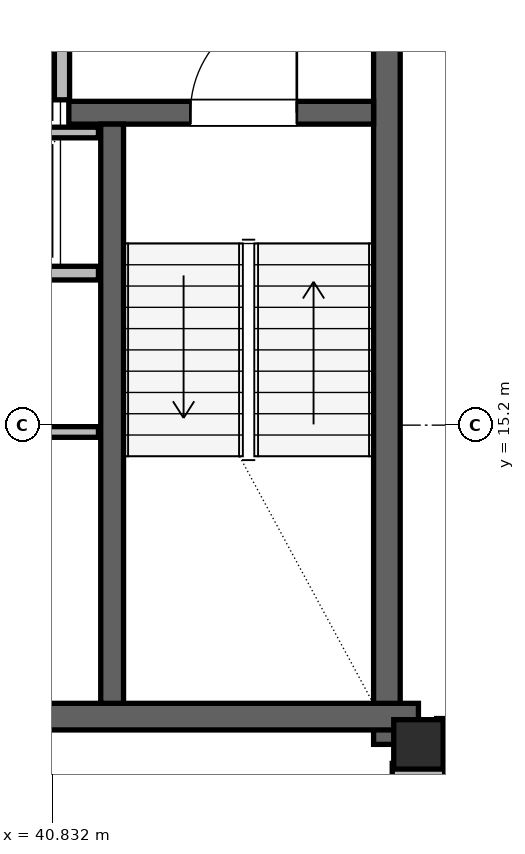
"""IFC4 building model, lengths in metres.
Left out: names, types, materials, properties, quantities, classifications, styles, units other than length and angle.
Written with IfcOpenShell. Run it as: python <this file> out.ifc"""

import sys

from ifc_helpers import new_model, si_unit, direction, frame, frame_2d, origin, origin_2d, place, context, subcontext, project, spatial, rectangle, hollow_rectangle, extrude, element, fill, save


model = new_model("IFC4")
c1 = context("Model", 3, precision=1e-05, world=origin(), true_north=direction((0.0, 1.0)))
c2 = subcontext(c1, "Body", "Model", "MODEL_VIEW")
j1 = project(units=[si_unit("LENGTHUNIT", "METRE"), si_unit("PLANEANGLEUNIT", "RADIAN")], contexts=[c1])
p1 = place(None, origin())
s1 = spatial("IfcSite", under=j1, at=p1, CompositionType="ELEMENT")
p2 = place(p1, origin())
s2 = spatial("IfcBuilding", under=s1, at=p2, CompositionType="ELEMENT")
p3 = place(p2, frame((0.0, 0.0, 273.3)))
s3 = spatial("IfcBuildingStorey", under=s2, at=p3, CompositionType="ELEMENT", Elevation=273.3)
p4 = place(p3, frame((45.65, 11.0, 0.0), z_axis=(0.0, 0.0, 1.0), x_axis=(1.0, 0.0, 0.0)))
e1 = element("IfcColumn", 1, at=p4, inside=s3, PredefinedType="COLUMN", context=c2, shape_type="SweptSolid", body=[
    extrude(hollow_rectangle(XDim=0.65, YDim=0.65, WallThickness=0.05, at=origin_2d()), origin(), (0.0, 0.0, 1.0), 3.9),
])
p5 = place(p3, frame((45.235, 11.0, 0.0), z_axis=(0.0, 0.0, 1.0), x_axis=(0.0, 1.0, 0.0)))
e2 = element("IfcWall", 2, at=p5, inside=s3, PredefinedType="SHEAR", context=c2, shape_type="SweptSolid", body=[
    extrude(rectangle(XDim=13.3, YDim=0.35, at=frame_2d((6.65, 0.0))), origin(), (0.0, 0.0, 1.0), 3.68),
])
p6 = place(p3, frame((38.55, 11.365, 0.0), z_axis=(0.0, 0.0, 1.0), x_axis=(1.0, 0.0, 0.0)))
e3 = element("IfcWall", 3, at=p6, inside=s3, PredefinedType="SHEAR", context=c2, shape_type="SweptSolid", body=[
    extrude(rectangle(XDim=7.1, YDim=0.35, at=frame_2d((3.55, 0.0))), origin(), (0.0, 0.0, 1.0), 3.68),
])
p7 = place(p3, frame((41.05, 19.31, 0.0), z_axis=(0.0, 0.0, 1.0), x_axis=(1.0, 0.0, 0.0)))
e4 = element("IfcWall", 4, at=p7, inside=s3, PredefinedType="SHEAR", context=c2, shape_type="SweptSolid", body=[
    extrude(rectangle(XDim=4.01, YDim=0.3, at=frame_2d((2.005, 0.0))), origin(), (0.0, 0.0, 1.0), 3.68),
])
p8 = place(p7, frame((1.6, 0.0, 0.0)))
e5 = element("IfcOpeningElement", 5, at=p8, cuts=e4, PredefinedType="OPENING", context=c2, shape_type="SweptSolid", body=[
    extrude(rectangle(XDim=1.4, YDim=2.2, at=frame_2d((0.7, 1.1))), frame((0.0, 0.15, 0.0), z_axis=(0.0, -1.0, 0.0), x_axis=(1.0, 0.0, 0.0)), (0.0, 0.0, 1.0), 0.3),
])
p9 = place(p3, frame((41.62, 11.54, 0.0), z_axis=(0.0, 0.0, 1.0), x_axis=(0.0, 1.0, 0.0)))
e6 = element("IfcWall", 6, at=p9, inside=s3, PredefinedType="SHEAR", context=c2, shape_type="SweptSolid", body=[
    extrude(rectangle(XDim=7.62, YDim=0.3, at=frame_2d((3.81, 0.0))), origin(), (0.0, 0.0, 1.0), 3.68),
])
p10 = place(p3, frame((58.532, 10.683, 0.0), z_axis=(0.0, 0.0, 1.0), x_axis=(-0.499999381892, 0.866025760649, 0.0)))
e7 = element("IfcWall", 7, at=p10, inside=s3, PredefinedType="SOLIDWALL", context=c2, shape_type="SweptSolid", body=[
    extrude(rectangle(XDim=37.343, YDim=0.29, at=frame_2d((18.671, 0.0))), origin(), (0.0, 0.0, 1.0), 3.058),
])
p11 = place(p10, frame((6.789, 0.0, 0.0)))
e8 = element("IfcOpeningElement", 8, at=p11, cuts=e7, PredefinedType="OPENING", context=c2, shape_type="SweptSolid", body=[
    extrude(rectangle(XDim=1.5, YDim=2.2, at=frame_2d((0.75, 1.1))), frame((0.0, 0.145, 0.0), z_axis=(0.0, -1.0, 0.0), x_axis=(1.0, 0.0, 0.0)), (0.0, 0.0, 1.0), 0.29),
])
p12 = place(p10, frame((27.808, 0.0, 0.0)))
e9 = element("IfcOpeningElement", 9, at=p12, cuts=e7, PredefinedType="OPENING", context=c2, shape_type="SweptSolid", body=[
    extrude(rectangle(XDim=1.5, YDim=2.2, at=frame_2d((0.75, 1.1))), frame((0.0, 0.145, 0.0), z_axis=(0.0, -1.0, 0.0), x_axis=(1.0, 0.0, 0.0)), (0.0, 0.0, 1.0), 0.29),
])
p13 = place(p10, frame((0.901, 0.0, 0.85)))
e10 = element("IfcOpeningElement", 10, at=p13, cuts=e7, PredefinedType="OPENING", context=c2, shape_type="SweptSolid", body=[
    extrude(rectangle(XDim=1.2, YDim=1.48, at=frame_2d((0.6, 0.74))), frame((0.0, 0.145, 0.0), z_axis=(0.0, -1.0, 0.0), x_axis=(1.0, 0.0, 0.0)), (0.0, 0.0, 1.0), 0.29),
])
p14 = place(p10, frame((12.688, 0.0, 0.85)))
e11 = element("IfcOpeningElement", 11, at=p14, cuts=e7, PredefinedType="OPENING", context=c2, shape_type="SweptSolid", body=[
    extrude(rectangle(XDim=3.0, YDim=2.098, at=frame_2d((1.5, 1.049))), frame((0.0, 0.145, 0.0), z_axis=(0.0, -1.0, 0.0), x_axis=(1.0, 0.0, 0.0)), (0.0, 0.0, 1.0), 0.29),
])
p15 = place(p10, frame((17.814, 0.0, 0.85)))
e12 = element("IfcOpeningElement", 12, at=p15, cuts=e7, PredefinedType="OPENING", context=c2, shape_type="SweptSolid", body=[
    extrude(rectangle(XDim=2.6, YDim=1.95, at=frame_2d((1.3, 0.975))), frame((0.0, 0.145, 0.0), z_axis=(0.0, -1.0, 0.0), x_axis=(1.0, 0.0, 0.0)), (0.0, 0.0, 1.0), 0.29),
])
p16 = place(p10, frame((35.362, 0.0, 0.85)))
e13 = element("IfcOpeningElement", 13, at=p16, cuts=e7, PredefinedType="OPENING", context=c2, shape_type="SweptSolid", body=[
    extrude(rectangle(XDim=1.2, YDim=1.48, at=frame_2d((0.6, 0.74))), frame((0.0, 0.145, 0.0), z_axis=(0.0, -1.0, 0.0), x_axis=(1.0, 0.0, 0.0)), (0.0, 0.0, 1.0), 0.29),
])
p17 = place(p10, frame((33.788, 0.0, 0.85)))
e14 = element("IfcOpeningElement", 14, at=p17, cuts=e7, PredefinedType="OPENING", context=c2, shape_type="SweptSolid", body=[
    extrude(rectangle(XDim=1.2, YDim=1.48, at=frame_2d((0.6, 0.74))), frame((0.0, 0.145, 0.0), z_axis=(0.0, -1.0, 0.0), x_axis=(1.0, 0.0, 0.0)), (0.0, 0.0, 1.0), 0.29),
])
p18 = place(p10, frame((22.74, 0.0, 0.85)))
e15 = element("IfcOpeningElement", 15, at=p18, cuts=e7, PredefinedType="OPENING", context=c2, shape_type="SweptSolid", body=[
    extrude(rectangle(XDim=1.2, YDim=1.48, at=frame_2d((0.6, 0.74))), frame((0.0, 0.145, 0.0), z_axis=(0.0, -1.0, 0.0), x_axis=(1.0, 0.0, 0.0)), (0.0, 0.0, 1.0), 0.29),
])
p19 = place(p10, frame((31.705, 0.0, 0.85)))
e16 = element("IfcOpeningElement", 16, at=p19, cuts=e7, PredefinedType="OPENING", context=c2, shape_type="SweptSolid", body=[
    extrude(rectangle(XDim=1.2, YDim=1.48, at=frame_2d((0.6, 0.74))), frame((0.0, 0.145, 0.0), z_axis=(0.0, -1.0, 0.0), x_axis=(1.0, 0.0, 0.0)), (0.0, 0.0, 1.0), 0.29),
])
p20 = place(p3, frame((40.96, 19.48, 0.0), z_axis=(0.0, 0.0, 1.0), x_axis=(0.0, 1.0, 0.0)))
e17 = element("IfcWall", 17, at=p20, inside=s3, PredefinedType="PARTITIONING", context=c2, shape_type="SweptSolid", body=[
    extrude(rectangle(XDim=4.5, YDim=0.2, at=frame_2d((2.25, 0.0))), origin(), (0.0, 0.0, 1.0), 3.68),
])
p21 = place(p20, frame((2.12, 0.0, 0.0)))
e18 = element("IfcOpeningElement", 18, at=p21, cuts=e17, PredefinedType="OPENING", context=c2, shape_type="SweptSolid", body=[
    extrude(rectangle(XDim=1.1, YDim=2.2, at=frame_2d((0.55, 1.1))), frame((0.0, 0.1, 0.0), z_axis=(0.0, -1.0, 0.0), x_axis=(1.0, 0.0, 0.0)), (0.0, 0.0, 1.0), 0.2),
])
p22 = place(p3, frame((38.78, 17.2, 0.0), z_axis=(0.0, 0.0, 1.0), x_axis=(1.0, 0.0, 0.0)))
e19 = element("IfcWall", 19, at=p22, inside=s3, PredefinedType="PARTITIONING", context=c2, shape_type="SweptSolid", body=[
    extrude(rectangle(XDim=2.66, YDim=0.18, at=frame_2d((1.33, 0.0))), origin(), (0.0, 0.0, 1.0), 3.68),
])
for number, where, z_axis, x_axis in (
    (20, (38.78, 19.05, 0.0), (0.0, 0.0, 1.0), (1.0, 0.0, 0.0)),
    (21, (38.78, 15.11, 0.0), (0.0, 0.0, 1.0), (1.0, 0.0, 0.0)),
):
    element("IfcWall", number, at=place(p3, frame(where, z_axis=z_axis, x_axis=x_axis)), inside=s3, PredefinedType="PARTITIONING", context=c2, shape_type="SweptSolid", body=[
        extrude(rectangle(XDim=2.66, YDim=0.14, at=frame_2d((1.33, 0.0))), origin(), (0.0, 0.0, 1.0), 3.68),
    ])
p23 = place(p3, frame((45.305, 10.65, 0.0), z_axis=(0.0, 0.0, 1.0), x_axis=(1.0, 0.0, 0.0)))
e22 = element("IfcWall", 22, at=p23, inside=s3, PredefinedType="PARTITIONING", context=c2, shape_type="SweptSolid", body=[
    extrude(rectangle(XDim=0.69, YDim=0.2, at=frame_2d((0.345, 0.0))), origin(), (0.0, 0.0, 1.0), 3.68),
])
p24 = place(p3, frame((45.99, 10.95, 0.0), z_axis=(0.0, 0.0, 1.0), x_axis=(0.0, 1.0, 0.0)))
e23 = element("IfcWall", 23, at=p24, inside=s3, PredefinedType="PARTITIONING", context=c2, shape_type="SweptSolid", body=[
    extrude(rectangle(XDim=0.39, YDim=0.2, at=frame_2d((0.195, 0.0))), origin(), (0.0, 0.0, 1.0), 3.68),
])
p25 = place(p8, origin())
e24 = element("IfcDoor", 24, at=p25, inside=s3, OperationType="SINGLE_SWING_RIGHT", PredefinedType="DOOR", context=c2, shape_type="SweptSolid", body=[
    extrude(rectangle(XDim=1.4, YDim=2.2, at=frame_2d((0.7, 1.1))), frame((0.0, 0.025, 0.0), z_axis=(0.0, -1.0, 0.0), x_axis=(1.0, 0.0, 0.0)), (0.0, 0.0, 1.0), 0.05),
])
fill(e5, e24)
save(model, sys.argv[1])
